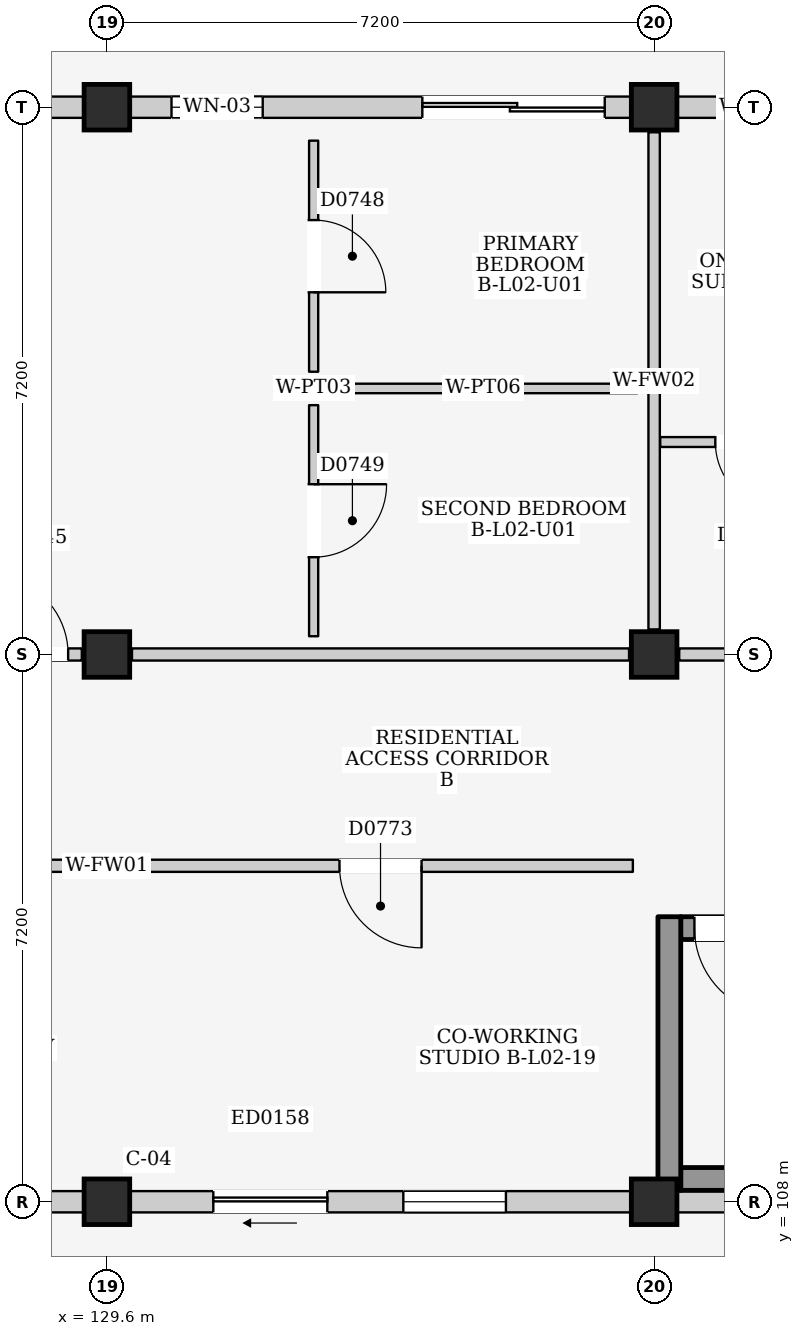
"""IFC4 building model, lengths in metres.
Left out: names, types, materials, properties, quantities, classifications, styles, units other than length and angle.
Written with IfcOpenShell. Run it as: python <this file> out.ifc"""

import sys

from ifc_helpers import new_model, si_unit, direction, frame, frame_2d, origin, origin_2d, place, context, subcontext, project, spatial, rectangle, extrude, element, fill, save


model = new_model("IFC4")
c1 = context("Model", 3, precision=1e-05, world=origin(), true_north=direction((0.0, 1.0)))
c2 = subcontext(c1, "Body", "Model", "MODEL_VIEW")
j1 = project(units=[si_unit("LENGTHUNIT", "METRE"), si_unit("PLANEANGLEUNIT", "RADIAN")], contexts=[c1])
p1 = place(None, origin())
s1 = spatial("IfcSite", under=j1, at=p1, CompositionType="ELEMENT")
p2 = place(p1, origin())
s2 = spatial("IfcBuilding", under=s1, at=p2, CompositionType="ELEMENT")
p3 = place(p2, frame((0.0, 0.0, 9.0)))
s3 = spatial("IfcBuildingStorey", under=s2, at=p3, CompositionType="ELEMENT", Elevation=9.0)
for number, where, z_axis, x_axis in (
    (1, (129.6, 108.0, 0.0), (0.0, 0.0, 1.0), (1.0, 0.0, 0.0)),
    (2, (129.6, 115.2, 0.0), (0.0, 0.0, 1.0), (1.0, 0.0, 0.0)),
    (3, (129.6, 122.4, 0.0), (0.0, 0.0, 1.0), (1.0, 0.0, 0.0)),
    (4, (136.8, 108.0, 0.0), (0.0, 0.0, 1.0), (1.0, 0.0, 0.0)),
    (5, (136.8, 115.2, 0.0), (0.0, 0.0, 1.0), (1.0, 0.0, 0.0)),
    (6, (136.8, 122.4, 0.0), (0.0, 0.0, 1.0), (1.0, 0.0, 0.0)),
):
    element("IfcColumn", number, at=place(p3, frame(where, z_axis=z_axis, x_axis=x_axis)), inside=s3, PredefinedType="COLUMN", context=c2, shape_type="SweptSolid", body=[
        extrude(rectangle(XDim=0.6, YDim=0.6, at=origin_2d()), origin(), (0.0, 0.0, 1.0), 3.2),
    ])
p4 = place(p3, frame((122.7, 108.0, 0.0), z_axis=(0.0, 0.0, 1.0), x_axis=(1.0, 0.0, 0.0)))
e7 = element("IfcWall", 7, at=p4, inside=s3, PredefinedType="ELEMENTEDWALL", context=c2, shape_type="SweptSolid", body=[
    extrude(rectangle(XDim=6.6, YDim=0.28, at=frame_2d((3.3, 0.0))), origin(), (0.0, 0.0, 1.0), 2.345),
])
p5 = place(p4, frame((1.1, 0.0, 0.0)))
e8 = element("IfcOpeningElement", 8, at=p5, cuts=e7, PredefinedType="OPENING", context=c2, shape_type="SweptSolid", body=[
    extrude(rectangle(XDim=1.5, YDim=2.12, at=frame_2d((0.75, 1.06))), frame((0.0, 0.155, 0.0), z_axis=(0.0, -1.0, 0.0), x_axis=(1.0, 0.0, 0.0)), (0.0, 0.0, 1.0), 0.31),
])
p6 = place(p4, frame((3.6, 0.0, 0.735)))
e9 = element("IfcOpeningElement", 9, at=p6, cuts=e7, PredefinedType="OPENING", context=c2, shape_type="SweptSolid", body=[
    extrude(rectangle(XDim=1.35, YDim=1.5, at=frame_2d((0.675, 0.75))), frame((0.0, 0.155, 0.0), z_axis=(0.0, -1.0, 0.0), x_axis=(1.0, 0.0, 0.0)), (0.0, 0.0, 1.0), 0.31),
])
p7 = place(p3, frame((122.7, 122.4, 0.0), z_axis=(0.0, 0.0, 1.0), x_axis=(1.0, 0.0, 0.0)))
e10 = element("IfcWall", 10, at=p7, inside=s3, PredefinedType="ELEMENTEDWALL", context=c2, shape_type="SweptSolid", body=[
    extrude(rectangle(XDim=6.6, YDim=0.28, at=frame_2d((3.3, 0.0))), origin(), (0.0, 0.0, 1.0), 2.425),
])
p8 = place(p7, frame((3.85, 0.0, 0.0)))
e11 = element("IfcOpeningElement", 11, at=p8, cuts=e10, PredefinedType="OPENING", context=c2, shape_type="SweptSolid", body=[
    extrude(rectangle(XDim=1.5, YDim=2.12, at=frame_2d((0.75, 1.06))), frame((0.0, 0.155, 0.0), z_axis=(0.0, -1.0, 0.0), x_axis=(1.0, 0.0, 0.0)), (0.0, 0.0, 1.0), 0.31),
])
p9 = place(p7, frame((0.55, 0.0, 0.815)))
e12 = element("IfcOpeningElement", 12, at=p9, cuts=e10, PredefinedType="OPENING", context=c2, shape_type="SweptSolid", body=[
    extrude(rectangle(XDim=1.5, YDim=1.5, at=frame_2d((0.75, 0.75))), frame((0.0, 0.155, 0.0), z_axis=(0.0, -1.0, 0.0), x_axis=(1.0, 0.0, 0.0)), (0.0, 0.0, 1.0), 0.31),
])
p10 = place(p3, frame((129.9, 108.0, 0.0), z_axis=(0.0, 0.0, 1.0), x_axis=(1.0, 0.0, 0.0)))
e13 = element("IfcWall", 13, at=p10, inside=s3, PredefinedType="ELEMENTEDWALL", context=c2, shape_type="SweptSolid", body=[
    extrude(rectangle(XDim=6.6, YDim=0.28, at=frame_2d((3.3, 0.0))), origin(), (0.0, 0.0, 1.0), 2.345),
])
p11 = place(p10, frame((1.1, 0.0, 0.0)))
e14 = element("IfcOpeningElement", 14, at=p11, cuts=e13, PredefinedType="OPENING", context=c2, shape_type="SweptSolid", body=[
    extrude(rectangle(XDim=1.5, YDim=2.12, at=frame_2d((0.75, 1.06))), frame((0.0, 0.155, 0.0), z_axis=(0.0, -1.0, 0.0), x_axis=(1.0, 0.0, 0.0)), (0.0, 0.0, 1.0), 0.31),
])
p12 = place(p10, frame((3.6, 0.0, 0.735)))
e15 = element("IfcOpeningElement", 15, at=p12, cuts=e13, PredefinedType="OPENING", context=c2, shape_type="SweptSolid", body=[
    extrude(rectangle(XDim=1.35, YDim=1.5, at=frame_2d((0.675, 0.75))), frame((0.0, 0.155, 0.0), z_axis=(0.0, -1.0, 0.0), x_axis=(1.0, 0.0, 0.0)), (0.0, 0.0, 1.0), 0.31),
])
p13 = place(p3, frame((129.9, 122.4, 0.0), z_axis=(0.0, 0.0, 1.0), x_axis=(1.0, 0.0, 0.0)))
e16 = element("IfcWall", 16, at=p13, inside=s3, PredefinedType="ELEMENTEDWALL", context=c2, shape_type="SweptSolid", body=[
    extrude(rectangle(XDim=6.6, YDim=0.28, at=frame_2d((3.3, 0.0))), origin(), (0.0, 0.0, 1.0), 2.425),
])
p14 = place(p13, frame((3.85, 0.0, 0.0)))
e17 = element("IfcOpeningElement", 17, at=p14, cuts=e16, PredefinedType="OPENING", context=c2, shape_type="SweptSolid", body=[
    extrude(rectangle(XDim=2.4, YDim=2.12, at=frame_2d((1.2, 1.06))), frame((0.0, 0.155, 0.0), z_axis=(0.0, -1.0, 0.0), x_axis=(1.0, 0.0, 0.0)), (0.0, 0.0, 1.0), 0.31),
])
p15 = place(p13, frame((0.55, 0.0, 0.9)))
e18 = element("IfcOpeningElement", 18, at=p15, cuts=e16, PredefinedType="OPENING", context=c2, shape_type="SweptSolid", body=[
    extrude(rectangle(XDim=1.2, YDim=1.35, at=frame_2d((0.6, 0.675))), frame((0.0, 0.155, 0.0), z_axis=(0.0, -1.0, 0.0), x_axis=(1.0, 0.0, 0.0)), (0.0, 0.0, 1.0), 0.31),
])
p16 = place(p3, frame((137.1, 108.0, 0.0), z_axis=(0.0, 0.0, 1.0), x_axis=(1.0, 0.0, 0.0)))
e19 = element("IfcWall", 19, at=p16, inside=s3, PredefinedType="ELEMENTEDWALL", context=c2, shape_type="SweptSolid", body=[
    extrude(rectangle(XDim=6.6, YDim=0.28, at=frame_2d((3.3, 0.0))), origin(), (0.0, 0.0, 1.0), 2.345),
])
p17 = place(p16, frame((2.8, 0.0, 1.2)))
e20 = element("IfcOpeningElement", 20, at=p17, cuts=e19, PredefinedType="OPENING", context=c2, shape_type="SweptSolid", body=[
    extrude(rectangle(XDim=1.0, YDim=0.9, at=frame_2d((0.5, 0.45))), frame((0.0, 0.155, 0.0), z_axis=(0.0, -1.0, 0.0), x_axis=(1.0, 0.0, 0.0)), (0.0, 0.0, 1.0), 0.31),
])
p18 = place(p3, frame((137.1, 122.4, 0.0), z_axis=(0.0, 0.0, 1.0), x_axis=(1.0, 0.0, 0.0)))
e21 = element("IfcWall", 21, at=p18, inside=s3, PredefinedType="ELEMENTEDWALL", context=c2, shape_type="SweptSolid", body=[
    extrude(rectangle(XDim=6.6, YDim=0.28, at=frame_2d((3.3, 0.0))), origin(), (0.0, 0.0, 1.0), 2.425),
])
p19 = place(p18, frame((3.85, 0.0, 0.0)))
e22 = element("IfcOpeningElement", 22, at=p19, cuts=e21, PredefinedType="OPENING", context=c2, shape_type="SweptSolid", body=[
    extrude(rectangle(XDim=2.0, YDim=2.12, at=frame_2d((1.0, 1.06))), frame((0.0, 0.155, 0.0), z_axis=(0.0, -1.0, 0.0), x_axis=(1.0, 0.0, 0.0)), (0.0, 0.0, 1.0), 0.31),
])
p20 = place(p18, frame((0.55, 0.0, 0.9)))
e23 = element("IfcOpeningElement", 23, at=p20, cuts=e21, PredefinedType="OPENING", context=c2, shape_type="SweptSolid", body=[
    extrude(rectangle(XDim=0.9, YDim=1.1, at=frame_2d((0.45, 0.55))), frame((0.0, 0.155, 0.0), z_axis=(0.0, -1.0, 0.0), x_axis=(1.0, 0.0, 0.0)), (0.0, 0.0, 1.0), 0.31),
])
p21 = place(p3, frame((137.15, 108.3, 0.0), z_axis=(0.0, 0.0, 1.0), x_axis=(1.0, 0.0, 0.0)))
e24 = element("IfcWall", 24, at=p21, inside=s3, PredefinedType="SHEAR", context=c2, shape_type="SweptSolid", body=[
    extrude(rectangle(XDim=6.5, YDim=0.3, at=frame_2d((3.25, 0.0))), origin(), (0.0, 0.0, 1.0), 2.96),
])
p22 = place(p3, frame((137.15, 111.6, 0.0), z_axis=(0.0, 0.0, 1.0), x_axis=(1.0, 0.0, 0.0)))
e25 = element("IfcWall", 25, at=p22, inside=s3, PredefinedType="SHEAR", context=c2, shape_type="SweptSolid", body=[
    extrude(rectangle(XDim=6.5, YDim=0.3, at=frame_2d((3.25, 0.0))), origin(), (0.0, 0.0, 1.0), 2.96),
])
p23 = place(p22, frame((0.18, 0.0, 0.0)))
e26 = element("IfcOpeningElement", 26, at=p23, cuts=e25, PredefinedType="OPENING", context=c2, shape_type="SweptSolid", body=[
    extrude(rectangle(XDim=1.15, YDim=2.2, at=frame_2d((0.575, 1.1))), frame((0.0, 0.165, 0.0), z_axis=(0.0, -1.0, 0.0), x_axis=(1.0, 0.0, 0.0)), (0.0, 0.0, 1.0), 0.33),
])
p24 = place(p3, frame((137.0, 108.15, 0.0), z_axis=(0.0, 0.0, 1.0), x_axis=(0.0, 1.0, 0.0)))
e27 = element("IfcWall", 27, at=p24, inside=s3, PredefinedType="SHEAR", context=c2, shape_type="SweptSolid", body=[
    extrude(rectangle(XDim=3.6, YDim=0.3, at=frame_2d((1.8, 0.0))), origin(), (0.0, 0.0, 1.0), 2.96),
])
p25 = place(p3, frame((122.73, 115.2, 0.0), z_axis=(0.0, 0.0, 1.0), x_axis=(1.0, 0.0, 0.0)))
e28 = element("IfcWall", 28, at=p25, inside=s3, PredefinedType="PARTITIONING", context=c2, shape_type="SweptSolid", body=[
    extrude(rectangle(XDim=6.54, YDim=0.16, at=frame_2d((3.27, 0.0))), origin(), (0.0, 0.0, 1.0), 2.345),
])
p26 = place(p25, frame((5.31, 0.0, 0.0)))
e29 = element("IfcOpeningElement", 29, at=p26, cuts=e28, PredefinedType="OPENING", context=c2, shape_type="SweptSolid", body=[
    extrude(rectangle(XDim=1.05, YDim=2.15, at=frame_2d((0.525, 1.075))), frame((0.0, 0.095, 0.0), z_axis=(0.0, -1.0, 0.0), x_axis=(1.0, 0.0, 0.0)), (0.0, 0.0, 1.0), 0.19),
])
p27 = place(p3, frame((129.93, 115.2, 0.0), z_axis=(0.0, 0.0, 1.0), x_axis=(1.0, 0.0, 0.0)))
e30 = element("IfcWall", 30, at=p27, inside=s3, PredefinedType="PARTITIONING", context=c2, shape_type="SweptSolid", body=[
    extrude(rectangle(XDim=6.54, YDim=0.16, at=frame_2d((3.27, 0.0))), origin(), (0.0, 0.0, 1.0), 2.345),
])
p28 = place(p3, frame((136.8, 115.53, 0.0), z_axis=(0.0, 0.0, 1.0), x_axis=(0.0, 1.0, 0.0)))
e31 = element("IfcWall", 31, at=p28, inside=s3, PredefinedType="PARTITIONING", context=c2, shape_type="SweptSolid", body=[
    extrude(rectangle(XDim=6.54, YDim=0.15, at=frame_2d((3.27, 0.0))), origin(), (0.0, 0.0, 1.0), 2.395),
])
p29 = place(p3, frame((132.32, 118.92, 0.0), z_axis=(0.0, 0.0, 1.0), x_axis=(0.0, 1.0, 0.0)))
e32 = element("IfcWall", 32, at=p29, inside=s3, PredefinedType="PARTITIONING", context=c2, shape_type="SweptSolid", body=[
    extrude(rectangle(XDim=3.04, YDim=0.12, at=frame_2d((1.52, 0.0))), origin(), (0.0, 0.0, 1.0), 2.96),
])
p30 = place(p29, frame((1.045, 0.0, 0.0)))
e33 = element("IfcOpeningElement", 33, at=p30, cuts=e32, PredefinedType="OPENING", context=c2, shape_type="SweptSolid", body=[
    extrude(rectangle(XDim=0.95, YDim=2.15, at=frame_2d((0.475, 1.075))), frame((0.0, 0.075, 0.0), z_axis=(0.0, -1.0, 0.0), x_axis=(1.0, 0.0, 0.0)), (0.0, 0.0, 1.0), 0.15),
])
p31 = place(p3, frame((132.52, 118.7, 0.0), z_axis=(0.0, 0.0, 1.0), x_axis=(1.0, 0.0, 0.0)))
e34 = element("IfcWall", 34, at=p31, inside=s3, PredefinedType="PARTITIONING", context=c2, shape_type="SweptSolid", body=[
    extrude(rectangle(XDim=4.06, YDim=0.125, at=frame_2d((2.03, 0.0))), origin(), (0.0, 0.0, 1.0), 2.96),
])
p32 = place(p3, frame((132.32, 115.44, 0.0), z_axis=(0.0, 0.0, 1.0), x_axis=(0.0, 1.0, 0.0)))
e35 = element("IfcWall", 35, at=p32, inside=s3, PredefinedType="PARTITIONING", context=c2, shape_type="SweptSolid", body=[
    extrude(rectangle(XDim=3.04, YDim=0.12, at=frame_2d((1.52, 0.0))), origin(), (0.0, 0.0, 1.0), 2.96),
])
p33 = place(p32, frame((1.04, 0.0, 0.0)))
e36 = element("IfcOpeningElement", 36, at=p33, cuts=e35, PredefinedType="OPENING", context=c2, shape_type="SweptSolid", body=[
    extrude(rectangle(XDim=0.96, YDim=2.15, at=frame_2d((0.48, 1.075))), frame((0.0, 0.075, 0.0), z_axis=(0.0, -1.0, 0.0), x_axis=(1.0, 0.0, 0.0)), (0.0, 0.0, 1.0), 0.15),
])
p34 = place(p3, frame((137.13, 115.2, 0.0), z_axis=(0.0, 0.0, 1.0), x_axis=(1.0, 0.0, 0.0)))
e37 = element("IfcWall", 37, at=p34, inside=s3, PredefinedType="PARTITIONING", context=c2, shape_type="SweptSolid", body=[
    extrude(rectangle(XDim=6.54, YDim=0.16, at=frame_2d((3.27, 0.0))), origin(), (0.0, 0.0, 1.0), 2.345),
])
p35 = place(p34, frame((4.795, 0.0, 0.0)))
e38 = element("IfcOpeningElement", 38, at=p35, cuts=e37, PredefinedType="OPENING", context=c2, shape_type="SweptSolid", body=[
    extrude(rectangle(XDim=1.05, YDim=2.15, at=frame_2d((0.525, 1.075))), frame((0.0, 0.095, 0.0), z_axis=(0.0, -1.0, 0.0), x_axis=(1.0, 0.0, 0.0)), (0.0, 0.0, 1.0), 0.19),
])
p36 = place(p3, frame((136.88, 117.995, 0.0), z_axis=(0.0, 0.0, 1.0), x_axis=(1.0, 0.0, 0.0)))
e39 = element("IfcWall", 39, at=p36, inside=s3, PredefinedType="PARTITIONING", context=c2, shape_type="SweptSolid", body=[
    extrude(rectangle(XDim=2.35, YDim=0.13, at=frame_2d((1.175, 0.0))), origin(), (0.0, 0.0, 1.0), 2.96),
])
p37 = place(p36, frame((0.725, 0.0, 0.0)))
e40 = element("IfcOpeningElement", 40, at=p37, cuts=e39, PredefinedType="OPENING", context=c2, shape_type="SweptSolid", body=[
    extrude(rectangle(XDim=0.9, YDim=2.1, at=frame_2d((0.45, 1.05))), frame((0.0, 0.08, 0.0), z_axis=(0.0, -1.0, 0.0), x_axis=(1.0, 0.0, 0.0)), (0.0, 0.0, 1.0), 0.16),
])
p38 = place(p3, frame((122.68, 112.42, 0.0), z_axis=(0.0, 0.0, 1.0), x_axis=(1.0, 0.0, 0.0)))
e41 = element("IfcWall", 41, at=p38, inside=s3, PredefinedType="PARTITIONING", context=c2, shape_type="SweptSolid", body=[
    extrude(rectangle(XDim=6.64, YDim=0.16, at=frame_2d((3.32, 0.0))), origin(), (0.0, 0.0, 1.0), 2.96),
])
p39 = place(p38, frame((2.78, 0.0, 0.0)))
e42 = element("IfcOpeningElement", 42, at=p39, cuts=e41, PredefinedType="OPENING", context=c2, shape_type="SweptSolid", body=[
    extrude(rectangle(XDim=1.08, YDim=2.22, at=frame_2d((0.54, 1.11))), frame((0.0, 0.095, 0.0), z_axis=(0.0, -1.0, 0.0), x_axis=(1.0, 0.0, 0.0)), (0.0, 0.0, 1.0), 0.19),
])
p40 = place(p3, frame((129.88, 112.42, 0.0), z_axis=(0.0, 0.0, 1.0), x_axis=(1.0, 0.0, 0.0)))
e43 = element("IfcWall", 43, at=p40, inside=s3, PredefinedType="PARTITIONING", context=c2, shape_type="SweptSolid", body=[
    extrude(rectangle(XDim=6.64, YDim=0.16, at=frame_2d((3.32, 0.0))), origin(), (0.0, 0.0, 1.0), 2.96),
])
p41 = place(p40, frame((2.78, 0.0, 0.0)))
e44 = element("IfcOpeningElement", 44, at=p41, cuts=e43, PredefinedType="OPENING", context=c2, shape_type="SweptSolid", body=[
    extrude(rectangle(XDim=1.08, YDim=2.22, at=frame_2d((0.54, 1.11))), frame((0.0, 0.095, 0.0), z_axis=(0.0, -1.0, 0.0), x_axis=(1.0, 0.0, 0.0)), (0.0, 0.0, 1.0), 0.19),
])
p42 = place(p11, frame((1.5, 0.0, 0.0), z_axis=(0.0, 0.0, 1.0), x_axis=(-1.0, 0.0, 0.0)))
e45 = element("IfcDoor", 45, at=p42, inside=s3, OperationType="SLIDING_TO_LEFT", PredefinedType="DOOR", context=c2, shape_type="SweptSolid", body=[
    extrude(rectangle(XDim=1.5, YDim=2.12, at=frame_2d((0.75, 1.06))), frame((0.0, 0.025, 0.0), z_axis=(0.0, -1.0, 0.0), x_axis=(1.0, 0.0, 0.0)), (0.0, 0.0, 1.0), 0.05),
])
fill(e14, e45)
p43 = place(p12, origin())
e46 = element("IfcWindow", 46, at=p43, inside=s3, PartitioningType="SINGLE_PANEL", PredefinedType="WINDOW", context=c2, shape_type="SweptSolid", body=[
    extrude(rectangle(XDim=1.35, YDim=1.5, at=frame_2d((0.675, 0.75))), frame((0.0, 0.03, 0.0), z_axis=(0.0, -1.0, 0.0), x_axis=(1.0, 0.0, 0.0)), (0.0, 0.0, 1.0), 0.06),
])
fill(e15, e46)
p44 = place(p14, frame((2.4, 0.0, 0.0), z_axis=(0.0, 0.0, 1.0), x_axis=(-1.0, 0.0, 0.0)))
e47 = element("IfcDoor", 47, at=p44, inside=s3, OperationType="DOUBLE_DOOR_SLIDING", PredefinedType="DOOR", context=c2, shape_type="SweptSolid", body=[
    extrude(rectangle(XDim=2.4, YDim=2.12, at=frame_2d((1.2, 1.06))), frame((0.0, 0.025, 0.0), z_axis=(0.0, -1.0, 0.0), x_axis=(1.0, 0.0, 0.0)), (0.0, 0.0, 1.0), 0.05),
])
fill(e17, e47)
p45 = place(p15, origin())
e48 = element("IfcWindow", 48, at=p45, inside=s3, PartitioningType="SINGLE_PANEL", PredefinedType="WINDOW", context=c2, shape_type="SweptSolid", body=[
    extrude(rectangle(XDim=1.2, YDim=1.35, at=frame_2d((0.6, 0.675))), frame((0.0, 0.03, 0.0), z_axis=(0.0, -1.0, 0.0), x_axis=(1.0, 0.0, 0.0)), (0.0, 0.0, 1.0), 0.06),
])
fill(e18, e48)
p46 = place(p20, origin())
e49 = element("IfcWindow", 49, at=p46, inside=s3, PartitioningType="SINGLE_PANEL", PredefinedType="WINDOW", context=c2, shape_type="SweptSolid", body=[
    extrude(rectangle(XDim=0.9, YDim=1.1, at=frame_2d((0.45, 0.55))), frame((0.0, 0.03, 0.0), z_axis=(0.0, -1.0, 0.0), x_axis=(1.0, 0.0, 0.0)), (0.0, 0.0, 1.0), 0.06),
])
fill(e23, e49)
p47 = place(p23, frame((1.15, 0.0, 0.0), z_axis=(0.0, 0.0, 1.0), x_axis=(-1.0, 0.0, 0.0)))
e50 = element("IfcDoor", 50, at=p47, inside=s3, OperationType="SINGLE_SWING_LEFT", PredefinedType="DOOR", context=c2, shape_type="SweptSolid", body=[
    extrude(rectangle(XDim=1.15, YDim=2.2, at=frame_2d((0.575, 1.1))), frame((0.0, 0.025, 0.0), z_axis=(0.0, -1.0, 0.0), x_axis=(1.0, 0.0, 0.0)), (0.0, 0.0, 1.0), 0.05),
])
fill(e26, e50)
p48 = place(p26, origin())
e51 = element("IfcDoor", 51, at=p48, inside=s3, OperationType="SINGLE_SWING_LEFT", PredefinedType="DOOR", context=c2, shape_type="SweptSolid", body=[
    extrude(rectangle(XDim=1.05, YDim=2.15, at=frame_2d((0.525, 1.075))), frame((0.0, 0.025, 0.0), z_axis=(0.0, -1.0, 0.0), x_axis=(1.0, 0.0, 0.0)), (0.0, 0.0, 1.0), 0.05),
])
fill(e29, e51)
p49 = place(p30, frame((0.95, 0.0, 0.0), z_axis=(0.0, 0.0, 1.0), x_axis=(-1.0, 0.0, 0.0)))
e52 = element("IfcDoor", 52, at=p49, inside=s3, OperationType="SINGLE_SWING_RIGHT", PredefinedType="DOOR", context=c2, shape_type="SweptSolid", body=[
    extrude(rectangle(XDim=0.95, YDim=2.15, at=frame_2d((0.475, 1.075))), frame((0.0, 0.025, 0.0), z_axis=(0.0, -1.0, 0.0), x_axis=(1.0, 0.0, 0.0)), (0.0, 0.0, 1.0), 0.05),
])
fill(e33, e52)
p50 = place(p33, frame((0.96, 0.0, 0.0), z_axis=(0.0, 0.0, 1.0), x_axis=(-1.0, 0.0, 0.0)))
e53 = element("IfcDoor", 53, at=p50, inside=s3, OperationType="SINGLE_SWING_LEFT", PredefinedType="DOOR", context=c2, shape_type="SweptSolid", body=[
    extrude(rectangle(XDim=0.96, YDim=2.15, at=frame_2d((0.48, 1.075))), frame((0.0, 0.025, 0.0), z_axis=(0.0, -1.0, 0.0), x_axis=(1.0, 0.0, 0.0)), (0.0, 0.0, 1.0), 0.05),
])
fill(e36, e53)
p51 = place(p37, frame((0.9, 0.0, 0.0), z_axis=(0.0, 0.0, 1.0), x_axis=(-1.0, 0.0, 0.0)))
e54 = element("IfcDoor", 54, at=p51, inside=s3, OperationType="SINGLE_SWING_LEFT", PredefinedType="DOOR", context=c2, shape_type="SweptSolid", body=[
    extrude(rectangle(XDim=0.9, YDim=2.1, at=frame_2d((0.45, 1.05))), frame((0.0, 0.025, 0.0), z_axis=(0.0, -1.0, 0.0), x_axis=(1.0, 0.0, 0.0)), (0.0, 0.0, 1.0), 0.05),
])
fill(e40, e54)
p52 = place(p41, frame((1.08, 0.0, 0.0), z_axis=(0.0, 0.0, 1.0), x_axis=(-1.0, 0.0, 0.0)))
e55 = element("IfcDoor", 55, at=p52, inside=s3, OperationType="SINGLE_SWING_LEFT", PredefinedType="DOOR", context=c2, shape_type="SweptSolid", body=[
    extrude(rectangle(XDim=1.08, YDim=2.22, at=frame_2d((0.54, 1.11))), frame((0.0, 0.025, 0.0), z_axis=(0.0, -1.0, 0.0), x_axis=(1.0, 0.0, 0.0)), (0.0, 0.0, 1.0), 0.05),
])
fill(e44, e55)
save(model, sys.argv[1])
